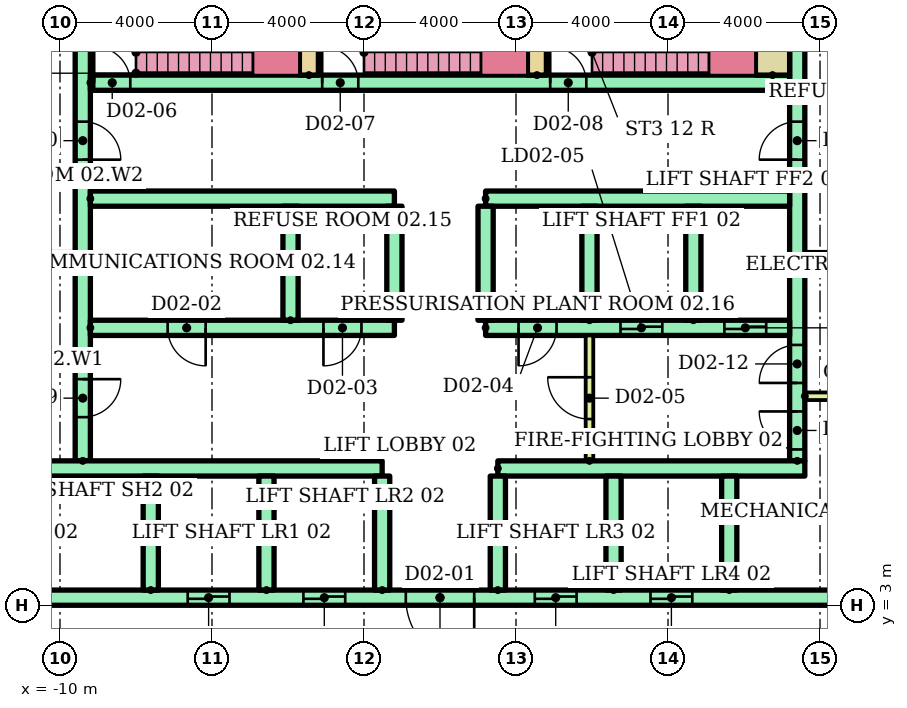
"""IFC4 building model, lengths in metres.
Left out: names, types, materials, properties, quantities, classifications, styles, units other than length and angle.
Written with IfcOpenShell. Run it as: python <this file> out.ifc"""

import sys

from ifc_helpers import new_model, si_unit, direction, frame, frame_2d, origin, place, context, subcontext, project, spatial, rectangle, extrude, element, fill, save


model = new_model("IFC4")
c1 = context("Model", 3, precision=1e-05, world=origin(), true_north=direction((0.0, 1.0)))
c2 = subcontext(c1, "Body", "Model", "MODEL_VIEW")
j1 = project(units=[si_unit("LENGTHUNIT", "METRE"), si_unit("PLANEANGLEUNIT", "RADIAN")], contexts=[c1])
p1 = place(None, origin())
s1 = spatial("IfcSite", under=j1, at=p1, CompositionType="ELEMENT")
p2 = place(p1, origin())
s2 = spatial("IfcBuilding", under=s1, at=p2, CompositionType="ELEMENT")
p3 = place(p2, frame((0.0, 0.0, 10.0)))
s3 = spatial("IfcBuildingStorey", under=s2, at=p3, CompositionType="ELEMENT", Elevation=10.0)
p4 = place(p3, frame((-9.4, 6.8, 0.0), z_axis=(0.0, 0.0, 1.0), x_axis=(0.0, 1.0, 0.0)))
e1 = element("IfcWall", 1, at=p4, inside=s3, PredefinedType="SHEAR", context=c2, shape_type="SweptSolid", body=[
    extrude(rectangle(XDim=12.7, YDim=0.4, at=frame_2d((6.35, 0.0))), origin(), (0.0, 0.0, 1.0), 3.7),
])
p5 = place(p4, frame((1.15, 0.0, 0.0)))
e2 = element("IfcOpeningElement", 2, at=p5, cuts=e1, PredefinedType="OPENING", context=c2, shape_type="SweptSolid", body=[
    extrude(rectangle(XDim=1.0, YDim=2.1, at=frame_2d((0.5, 1.05))), frame((0.0, 0.21, 0.0), z_axis=(0.0, -1.0, 0.0), x_axis=(1.0, 0.0, 0.0)), (0.0, 0.0, 1.0), 0.42),
])
p6 = place(p4, frame((7.925, 0.0, 0.0)))
e3 = element("IfcOpeningElement", 3, at=p6, cuts=e1, PredefinedType="OPENING", context=c2, shape_type="SweptSolid", body=[
    extrude(rectangle(XDim=1.0, YDim=2.1, at=frame_2d((0.5, 1.05))), frame((0.0, 0.21, 0.0), z_axis=(0.0, -1.0, 0.0), x_axis=(1.0, 0.0, 0.0)), (0.0, 0.0, 1.0), 0.42),
])
p7 = place(p3, frame((9.4, 6.8, 0.0), z_axis=(0.0, 0.0, 1.0), x_axis=(0.0, 1.0, 0.0)))
e4 = element("IfcWall", 4, at=p7, inside=s3, PredefinedType="SHEAR", context=c2, shape_type="SweptSolid", body=[
    extrude(rectangle(XDim=12.7, YDim=0.4, at=frame_2d((6.35, 0.0))), origin(), (0.0, 0.0, 1.0), 3.7),
])
p8 = place(p7, frame((0.3, 0.0, 0.0)))
e5 = element("IfcOpeningElement", 5, at=p8, cuts=e4, PredefinedType="OPENING", context=c2, shape_type="SweptSolid", body=[
    extrude(rectangle(XDim=1.0, YDim=2.1, at=frame_2d((0.5, 1.05))), frame((0.0, 0.21, 0.0), z_axis=(0.0, -1.0, 0.0), x_axis=(1.0, 0.0, 0.0)), (0.0, 0.0, 1.0), 0.42),
])
p9 = place(p7, frame((2.05, 0.0, 0.0)))
e6 = element("IfcOpeningElement", 6, at=p9, cuts=e4, PredefinedType="OPENING", context=c2, shape_type="SweptSolid", body=[
    extrude(rectangle(XDim=1.0, YDim=2.1, at=frame_2d((0.5, 1.05))), frame((0.0, 0.21, 0.0), z_axis=(0.0, -1.0, 0.0), x_axis=(1.0, 0.0, 0.0)), (0.0, 0.0, 1.0), 0.42),
])
p10 = place(p7, frame((7.925, 0.0, 0.0)))
e7 = element("IfcOpeningElement", 7, at=p10, cuts=e4, PredefinedType="OPENING", context=c2, shape_type="SweptSolid", body=[
    extrude(rectangle(XDim=1.0, YDim=2.1, at=frame_2d((0.5, 1.05))), frame((0.0, 0.21, 0.0), z_axis=(0.0, -1.0, 0.0), x_axis=(1.0, 0.0, 0.0)), (0.0, 0.0, 1.0), 0.42),
])
p11 = place(p3, frame((-13.5, 3.2, 0.0)))
e8 = element("IfcWall", 8, at=p11, inside=s3, PredefinedType="SHEAR", context=c2, shape_type="SweptSolid", body=[
    extrude(rectangle(XDim=27.0, YDim=0.4, at=frame_2d((13.5, 0.0))), origin(), (0.0, 0.0, 1.0), 3.7),
])
p12 = place(p11, frame((6.861, 0.0, 0.0)))
e9 = element("IfcOpeningElement", 9, at=p12, cuts=e8, PredefinedType="OPENING", context=c2, shape_type="SweptSolid", body=[
    extrude(rectangle(XDim=1.1, YDim=2.1, at=frame_2d((0.55, 1.05))), frame((0.0, 0.21, 0.0), z_axis=(0.0, -1.0, 0.0), x_axis=(1.0, 0.0, 0.0)), (0.0, 0.0, 1.0), 0.42),
])
p13 = place(p11, frame((9.906, 0.0, 0.0)))
e10 = element("IfcOpeningElement", 10, at=p13, cuts=e8, PredefinedType="OPENING", context=c2, shape_type="SweptSolid", body=[
    extrude(rectangle(XDim=1.1, YDim=2.1, at=frame_2d((0.55, 1.05))), frame((0.0, 0.21, 0.0), z_axis=(0.0, -1.0, 0.0), x_axis=(1.0, 0.0, 0.0)), (0.0, 0.0, 1.0), 0.42),
])
p14 = place(p11, frame((15.994, 0.0, 0.0)))
e11 = element("IfcOpeningElement", 11, at=p14, cuts=e8, PredefinedType="OPENING", context=c2, shape_type="SweptSolid", body=[
    extrude(rectangle(XDim=1.1, YDim=2.1, at=frame_2d((0.55, 1.05))), frame((0.0, 0.21, 0.0), z_axis=(0.0, -1.0, 0.0), x_axis=(1.0, 0.0, 0.0)), (0.0, 0.0, 1.0), 0.42),
])
p15 = place(p11, frame((19.039, 0.0, 0.0)))
e12 = element("IfcOpeningElement", 12, at=p15, cuts=e8, PredefinedType="OPENING", context=c2, shape_type="SweptSolid", body=[
    extrude(rectangle(XDim=1.1, YDim=2.1, at=frame_2d((0.55, 1.05))), frame((0.0, 0.21, 0.0), z_axis=(0.0, -1.0, 0.0), x_axis=(1.0, 0.0, 0.0)), (0.0, 0.0, 1.0), 0.42),
])
p16 = place(p11, frame((12.6, 0.0, 0.0)))
e13 = element("IfcOpeningElement", 13, at=p16, cuts=e8, PredefinedType="OPENING", context=c2, shape_type="SweptSolid", body=[
    extrude(rectangle(XDim=1.8, YDim=2.1, at=frame_2d((0.9, 1.05))), frame((0.0, 0.21, 0.0), z_axis=(0.0, -1.0, 0.0), x_axis=(1.0, 0.0, 0.0)), (0.0, 0.0, 1.0), 0.42),
])
p17 = place(p3, frame((-13.5, 6.6, 0.0)))
e14 = element("IfcWall", 14, at=p17, inside=s3, PredefinedType="SHEAR", context=c2, shape_type="SweptSolid", body=[
    extrude(rectangle(XDim=11.978, YDim=0.4, at=frame_2d((5.989, 0.0))), origin(), (0.0, 0.0, 1.0), 3.7),
])
p18 = place(p3, frame((1.522, 6.6, 0.0)))
e15 = element("IfcWall", 15, at=p18, inside=s3, PredefinedType="SHEAR", context=c2, shape_type="SweptSolid", body=[
    extrude(rectangle(XDim=8.078, YDim=0.4, at=frame_2d((4.039, 0.0))), origin(), (0.0, 0.0, 1.0), 3.7),
])
for number, where, z_axis, x_axis in (
    (16, (-7.611, 3.4, 0.0), (0.0, 0.0, 1.0), (0.0, 1.0, 0.0)),
    (17, (-4.567, 3.4, 0.0), (0.0, 0.0, 1.0), (0.0, 1.0, 0.0)),
    (18, (-1.522, 3.4, 0.0), (0.0, 0.0, 1.0), (0.0, 1.0, 0.0)),
    (19, (1.522, 3.4, 0.0), (0.0, 0.0, 1.0), (0.0, 1.0, 0.0)),
    (20, (4.567, 3.4, 0.0), (0.0, 0.0, 1.0), (0.0, 1.0, 0.0)),
    (21, (7.611, 3.4, 0.0), (0.0, 0.0, 1.0), (0.0, 1.0, 0.0)),
):
    element("IfcWall", number, at=place(p3, frame(where, z_axis=z_axis, x_axis=x_axis)), inside=s3, PredefinedType="SHEAR", context=c2, shape_type="SweptSolid", body=[
        extrude(rectangle(XDim=3.0, YDim=0.4, at=frame_2d((1.5, 0.0))), origin(), (0.0, 0.0, 1.0), 3.7),
    ])
p19 = place(p3, frame((-9.2, 10.3, 0.0)))
e22 = element("IfcWall", 22, at=p19, inside=s3, PredefinedType="SHEAR", context=c2, shape_type="SweptSolid", body=[
    extrude(rectangle(XDim=8.0, YDim=0.4, at=frame_2d((4.0, 0.0))), origin(), (0.0, 0.0, 1.0), 3.7),
])
p20 = place(p19, frame((2.033, 0.0, 0.0)))
e23 = element("IfcOpeningElement", 23, at=p20, cuts=e22, PredefinedType="OPENING", context=c2, shape_type="SweptSolid", body=[
    extrude(rectangle(XDim=1.0, YDim=2.1, at=frame_2d((0.5, 1.05))), frame((0.0, 0.21, 0.0), z_axis=(0.0, -1.0, 0.0), x_axis=(1.0, 0.0, 0.0)), (0.0, 0.0, 1.0), 0.42),
])
p21 = place(p19, frame((6.133, 0.0, 0.0)))
e24 = element("IfcOpeningElement", 24, at=p21, cuts=e22, PredefinedType="OPENING", context=c2, shape_type="SweptSolid", body=[
    extrude(rectangle(XDim=1.0, YDim=2.1, at=frame_2d((0.5, 1.05))), frame((0.0, 0.21, 0.0), z_axis=(0.0, -1.0, 0.0), x_axis=(1.0, 0.0, 0.0)), (0.0, 0.0, 1.0), 0.42),
])
p22 = place(p3, frame((-9.2, 13.7, 0.0)))
e25 = element("IfcWall", 25, at=p22, inside=s3, PredefinedType="SHEAR", context=c2, shape_type="SweptSolid", body=[
    extrude(rectangle(XDim=8.0, YDim=0.4, at=frame_2d((4.0, 0.0))), origin(), (0.0, 0.0, 1.0), 3.7),
])
p23 = place(p3, frame((1.2, 10.3, 0.0)))
e26 = element("IfcWall", 26, at=p23, inside=s3, PredefinedType="SHEAR", context=c2, shape_type="SweptSolid", body=[
    extrude(rectangle(XDim=8.0, YDim=0.4, at=frame_2d((4.0, 0.0))), origin(), (0.0, 0.0, 1.0), 3.7),
])
p24 = place(p23, frame((3.55, 0.0, 0.0)))
e27 = element("IfcOpeningElement", 27, at=p24, cuts=e26, PredefinedType="OPENING", context=c2, shape_type="SweptSolid", body=[
    extrude(rectangle(XDim=1.1, YDim=2.1, at=frame_2d((0.55, 1.05))), frame((0.0, 0.21, 0.0), z_axis=(0.0, -1.0, 0.0), x_axis=(1.0, 0.0, 0.0)), (0.0, 0.0, 1.0), 0.42),
])
p25 = place(p23, frame((6.283, 0.0, 0.0)))
e28 = element("IfcOpeningElement", 28, at=p25, cuts=e26, PredefinedType="OPENING", context=c2, shape_type="SweptSolid", body=[
    extrude(rectangle(XDim=1.1, YDim=2.1, at=frame_2d((0.55, 1.05))), frame((0.0, 0.21, 0.0), z_axis=(0.0, -1.0, 0.0), x_axis=(1.0, 0.0, 0.0)), (0.0, 0.0, 1.0), 0.42),
])
p26 = place(p23, frame((0.867, 0.0, 0.0)))
e29 = element("IfcOpeningElement", 29, at=p26, cuts=e26, PredefinedType="OPENING", context=c2, shape_type="SweptSolid", body=[
    extrude(rectangle(XDim=1.0, YDim=2.1, at=frame_2d((0.5, 1.05))), frame((0.0, 0.21, 0.0), z_axis=(0.0, -1.0, 0.0), x_axis=(1.0, 0.0, 0.0)), (0.0, 0.0, 1.0), 0.42),
])
p27 = place(p3, frame((1.2, 13.7, 0.0)))
e30 = element("IfcWall", 30, at=p27, inside=s3, PredefinedType="SHEAR", context=c2, shape_type="SweptSolid", body=[
    extrude(rectangle(XDim=8.0, YDim=0.4, at=frame_2d((4.0, 0.0))), origin(), (0.0, 0.0, 1.0), 3.7),
])
for number, where, z_axis, x_axis in (
    (31, (-3.933, 10.5, 0.0), (0.0, 0.0, 1.0), (0.0, 1.0, 0.0)),
    (32, (-1.2, 10.5, 0.0), (0.0, 0.0, 1.0), (0.0, 1.0, 0.0)),
    (33, (1.2, 10.5, 0.0), (0.0, 0.0, 1.0), (0.0, 1.0, 0.0)),
    (34, (3.933, 10.5, 0.0), (0.0, 0.0, 1.0), (0.0, 1.0, 0.0)),
    (35, (6.667, 10.5, 0.0), (0.0, 0.0, 1.0), (0.0, 1.0, 0.0)),
):
    element("IfcWall", number, at=place(p3, frame(where, z_axis=z_axis, x_axis=x_axis)), inside=s3, PredefinedType="SHEAR", context=c2, shape_type="SweptSolid", body=[
        extrude(rectangle(XDim=3.0, YDim=0.4, at=frame_2d((1.5, 0.0))), origin(), (0.0, 0.0, 1.0), 3.7),
    ])
p28 = place(p3, frame((3.933, 6.8, 0.0), z_axis=(0.0, 0.0, 1.0), x_axis=(0.0, 1.0, 0.0)))
e36 = element("IfcWall", 36, at=p28, inside=s3, PredefinedType="PARTITIONING", context=c2, shape_type="SweptSolid", body=[
    extrude(rectangle(XDim=3.3, YDim=0.2, at=frame_2d((1.65, 0.0))), origin(), (0.0, 0.0, 1.0), 3.7),
])
p29 = place(p28, frame((1.1, 0.0, 0.0)))
e37 = element("IfcOpeningElement", 37, at=p29, cuts=e36, PredefinedType="OPENING", context=c2, shape_type="SweptSolid", body=[
    extrude(rectangle(XDim=1.1, YDim=2.1, at=frame_2d((0.55, 1.05))), frame((0.0, 0.11, 0.0), z_axis=(0.0, -1.0, 0.0), x_axis=(1.0, 0.0, 0.0)), (0.0, 0.0, 1.0), 0.22),
])
p30 = place(p3, frame((-9.2, 16.75, 0.0)))
e38 = element("IfcWall", 38, at=p30, inside=s3, PredefinedType="SHEAR", context=c2, shape_type="SweptSolid", body=[
    extrude(rectangle(XDim=18.4, YDim=0.4, at=frame_2d((9.2, 0.0))), origin(), (0.0, 0.0, 1.0), 3.7),
])
p31 = place(p30, frame((0.1, 0.0, 0.0)))
e39 = element("IfcOpeningElement", 39, at=p31, cuts=e38, PredefinedType="OPENING", context=c2, shape_type="SweptSolid", body=[
    extrude(rectangle(XDim=0.95, YDim=2.1, at=frame_2d((0.475, 1.05))), frame((0.0, 0.21, 0.0), z_axis=(0.0, -1.0, 0.0), x_axis=(1.0, 0.0, 0.0)), (0.0, 0.0, 1.0), 0.42),
])
p32 = place(p30, frame((6.1, 0.0, 0.0)))
e40 = element("IfcOpeningElement", 40, at=p32, cuts=e38, PredefinedType="OPENING", context=c2, shape_type="SweptSolid", body=[
    extrude(rectangle(XDim=0.95, YDim=2.1, at=frame_2d((0.475, 1.05))), frame((0.0, 0.21, 0.0), z_axis=(0.0, -1.0, 0.0), x_axis=(1.0, 0.0, 0.0)), (0.0, 0.0, 1.0), 0.42),
])
p33 = place(p30, frame((12.1, 0.0, 0.0)))
e41 = element("IfcOpeningElement", 41, at=p33, cuts=e38, PredefinedType="OPENING", context=c2, shape_type="SweptSolid", body=[
    extrude(rectangle(XDim=0.95, YDim=2.1, at=frame_2d((0.475, 1.05))), frame((0.0, 0.21, 0.0), z_axis=(0.0, -1.0, 0.0), x_axis=(1.0, 0.0, 0.0)), (0.0, 0.0, 1.0), 0.42),
])
for number, where, z_axis, x_axis in (
    (42, (-3.45, 16.95, 0.0), (0.0, 0.0, 1.0), (0.0, 1.0, 0.0)),
    (43, (2.55, 16.95, 0.0), (0.0, 0.0, 1.0), (0.0, 1.0, 0.0)),
):
    element("IfcWall", number, at=place(p3, frame(where, z_axis=z_axis, x_axis=x_axis)), inside=s3, PredefinedType="SHEAR", context=c2, shape_type="SweptSolid", body=[
        extrude(rectangle(XDim=2.55, YDim=0.5, at=frame_2d((1.275, 0.0))), origin(), (0.0, 0.0, 1.0), 3.7),
    ])
p34 = place(p3, frame((8.75, 16.95, 0.0), z_axis=(0.0, 0.0, 1.0), x_axis=(0.0, 1.0, 0.0)))
e44 = element("IfcWall", 44, at=p34, inside=s3, PredefinedType="SHEAR", context=c2, shape_type="SweptSolid", body=[
    extrude(rectangle(XDim=2.55, YDim=0.9, at=frame_2d((1.275, 0.0))), origin(), (0.0, 0.0, 1.0), 3.7),
])
for number, where in (
    (45, (-13.5, 12.2, 0.0)),
    (46, (9.6, 8.5, 0.0)),
    (47, (9.6, 12.2, 0.0)),
):
    element("IfcWall", number, at=place(p3, frame(where)), inside=s3, PredefinedType="PARTITIONING", context=c2, shape_type="SweptSolid", body=[
        extrude(rectangle(XDim=3.9, YDim=0.2, at=frame_2d((1.95, 0.0))), origin(), (0.0, 0.0, 1.0), 3.7),
    ])
p35 = place(p12, origin())
e48 = element("IfcDoor", 48, at=p35, inside=s3, OperationType="SLIDING_TO_LEFT", PredefinedType="DOOR", context=c2, shape_type="SweptSolid", body=[
    extrude(rectangle(XDim=1.1, YDim=2.1, at=frame_2d((0.55, 1.05))), frame((0.0, 0.025, 0.0), z_axis=(0.0, -1.0, 0.0), x_axis=(1.0, 0.0, 0.0)), (0.0, 0.0, 1.0), 0.05),
])
fill(e9, e48)
p36 = place(p13, origin())
e49 = element("IfcDoor", 49, at=p36, inside=s3, OperationType="SLIDING_TO_LEFT", PredefinedType="DOOR", context=c2, shape_type="SweptSolid", body=[
    extrude(rectangle(XDim=1.1, YDim=2.1, at=frame_2d((0.55, 1.05))), frame((0.0, 0.025, 0.0), z_axis=(0.0, -1.0, 0.0), x_axis=(1.0, 0.0, 0.0)), (0.0, 0.0, 1.0), 0.05),
])
fill(e10, e49)
p37 = place(p14, origin())
e50 = element("IfcDoor", 50, at=p37, inside=s3, OperationType="SLIDING_TO_LEFT", PredefinedType="DOOR", context=c2, shape_type="SweptSolid", body=[
    extrude(rectangle(XDim=1.1, YDim=2.1, at=frame_2d((0.55, 1.05))), frame((0.0, 0.025, 0.0), z_axis=(0.0, -1.0, 0.0), x_axis=(1.0, 0.0, 0.0)), (0.0, 0.0, 1.0), 0.05),
])
fill(e11, e50)
p38 = place(p15, origin())
e51 = element("IfcDoor", 51, at=p38, inside=s3, OperationType="SLIDING_TO_LEFT", PredefinedType="DOOR", context=c2, shape_type="SweptSolid", body=[
    extrude(rectangle(XDim=1.1, YDim=2.1, at=frame_2d((0.55, 1.05))), frame((0.0, 0.025, 0.0), z_axis=(0.0, -1.0, 0.0), x_axis=(1.0, 0.0, 0.0)), (0.0, 0.0, 1.0), 0.05),
])
fill(e12, e51)
p39 = place(p16, frame((1.8, 0.0, 0.0), z_axis=(0.0, 0.0, 1.0), x_axis=(-1.0, 0.0, 0.0)))
e52 = element("IfcDoor", 52, at=p39, inside=s3, OperationType="DOUBLE_DOOR_SINGLE_SWING", PredefinedType="DOOR", context=c2, shape_type="SweptSolid", body=[
    extrude(rectangle(XDim=1.8, YDim=2.1, at=frame_2d((0.9, 1.05))), frame((0.0, 0.025, 0.0), z_axis=(0.0, -1.0, 0.0), x_axis=(1.0, 0.0, 0.0)), (0.0, 0.0, 1.0), 0.05),
])
fill(e13, e52)
p40 = place(p24, origin())
e53 = element("IfcDoor", 53, at=p40, inside=s3, OperationType="SLIDING_TO_LEFT", PredefinedType="DOOR", context=c2, shape_type="SweptSolid", body=[
    extrude(rectangle(XDim=1.1, YDim=2.1, at=frame_2d((0.55, 1.05))), frame((0.0, 0.025, 0.0), z_axis=(0.0, -1.0, 0.0), x_axis=(1.0, 0.0, 0.0)), (0.0, 0.0, 1.0), 0.05),
])
fill(e27, e53)
p41 = place(p25, origin())
e54 = element("IfcDoor", 54, at=p41, inside=s3, OperationType="SLIDING_TO_LEFT", PredefinedType="DOOR", context=c2, shape_type="SweptSolid", body=[
    extrude(rectangle(XDim=1.1, YDim=2.1, at=frame_2d((0.55, 1.05))), frame((0.0, 0.025, 0.0), z_axis=(0.0, -1.0, 0.0), x_axis=(1.0, 0.0, 0.0)), (0.0, 0.0, 1.0), 0.05),
])
fill(e28, e54)
p42 = place(p20, frame((1.0, 0.0, 0.0), z_axis=(0.0, 0.0, 1.0), x_axis=(-1.0, 0.0, 0.0)))
e55 = element("IfcDoor", 55, at=p42, inside=s3, OperationType="SINGLE_SWING_RIGHT", PredefinedType="DOOR", context=c2, shape_type="SweptSolid", body=[
    extrude(rectangle(XDim=1.0, YDim=2.1, at=frame_2d((0.5, 1.05))), frame((0.0, 0.025, 0.0), z_axis=(0.0, -1.0, 0.0), x_axis=(1.0, 0.0, 0.0)), (0.0, 0.0, 1.0), 0.05),
])
fill(e23, e55)
p43 = place(p21, frame((1.0, 0.0, 0.0), z_axis=(0.0, 0.0, 1.0), x_axis=(-1.0, 0.0, 0.0)))
e56 = element("IfcDoor", 56, at=p43, inside=s3, OperationType="SINGLE_SWING_LEFT", PredefinedType="DOOR", context=c2, shape_type="SweptSolid", body=[
    extrude(rectangle(XDim=1.0, YDim=2.1, at=frame_2d((0.5, 1.05))), frame((0.0, 0.025, 0.0), z_axis=(0.0, -1.0, 0.0), x_axis=(1.0, 0.0, 0.0)), (0.0, 0.0, 1.0), 0.05),
])
fill(e24, e56)
p44 = place(p26, frame((1.0, 0.0, 0.0), z_axis=(0.0, 0.0, 1.0), x_axis=(-1.0, 0.0, 0.0)))
e57 = element("IfcDoor", 57, at=p44, inside=s3, OperationType="SINGLE_SWING_LEFT", PredefinedType="DOOR", context=c2, shape_type="SweptSolid", body=[
    extrude(rectangle(XDim=1.0, YDim=2.1, at=frame_2d((0.5, 1.05))), frame((0.0, 0.025, 0.0), z_axis=(0.0, -1.0, 0.0), x_axis=(1.0, 0.0, 0.0)), (0.0, 0.0, 1.0), 0.05),
])
fill(e29, e57)
p45 = place(p29, origin())
e58 = element("IfcDoor", 58, at=p45, inside=s3, OperationType="SINGLE_SWING_RIGHT", PredefinedType="DOOR", context=c2, shape_type="SweptSolid", body=[
    extrude(rectangle(XDim=1.1, YDim=2.1, at=frame_2d((0.55, 1.05))), frame((0.0, 0.025, 0.0), z_axis=(0.0, -1.0, 0.0), x_axis=(1.0, 0.0, 0.0)), (0.0, 0.0, 1.0), 0.05),
])
fill(e37, e58)
p46 = place(p31, origin())
e59 = element("IfcDoor", 59, at=p46, inside=s3, OperationType="SINGLE_SWING_LEFT", PredefinedType="DOOR", context=c2, shape_type="SweptSolid", body=[
    extrude(rectangle(XDim=0.95, YDim=2.1, at=frame_2d((0.475, 1.05))), frame((0.0, 0.025, 0.0), z_axis=(0.0, -1.0, 0.0), x_axis=(1.0, 0.0, 0.0)), (0.0, 0.0, 1.0), 0.05),
])
fill(e39, e59)
p47 = place(p32, origin())
e60 = element("IfcDoor", 60, at=p47, inside=s3, OperationType="SINGLE_SWING_LEFT", PredefinedType="DOOR", context=c2, shape_type="SweptSolid", body=[
    extrude(rectangle(XDim=0.95, YDim=2.1, at=frame_2d((0.475, 1.05))), frame((0.0, 0.025, 0.0), z_axis=(0.0, -1.0, 0.0), x_axis=(1.0, 0.0, 0.0)), (0.0, 0.0, 1.0), 0.05),
])
fill(e40, e60)
p48 = place(p33, origin())
e61 = element("IfcDoor", 61, at=p48, inside=s3, OperationType="SINGLE_SWING_LEFT", PredefinedType="DOOR", context=c2, shape_type="SweptSolid", body=[
    extrude(rectangle(XDim=0.95, YDim=2.1, at=frame_2d((0.475, 1.05))), frame((0.0, 0.025, 0.0), z_axis=(0.0, -1.0, 0.0), x_axis=(1.0, 0.0, 0.0)), (0.0, 0.0, 1.0), 0.05),
])
fill(e41, e61)
p49 = place(p5, frame((1.0, 0.0, 0.0), z_axis=(0.0, 0.0, 1.0), x_axis=(-1.0, 0.0, 0.0)))
e62 = element("IfcDoor", 62, at=p49, inside=s3, OperationType="SINGLE_SWING_RIGHT", PredefinedType="DOOR", context=c2, shape_type="SweptSolid", body=[
    extrude(rectangle(XDim=1.0, YDim=2.1, at=frame_2d((0.5, 1.05))), frame((0.0, 0.025, 0.0), z_axis=(0.0, -1.0, 0.0), x_axis=(1.0, 0.0, 0.0)), (0.0, 0.0, 1.0), 0.05),
])
fill(e2, e62)
p50 = place(p6, frame((1.0, 0.0, 0.0), z_axis=(0.0, 0.0, 1.0), x_axis=(-1.0, 0.0, 0.0)))
e63 = element("IfcDoor", 63, at=p50, inside=s3, OperationType="SINGLE_SWING_LEFT", PredefinedType="DOOR", context=c2, shape_type="SweptSolid", body=[
    extrude(rectangle(XDim=1.0, YDim=2.1, at=frame_2d((0.5, 1.05))), frame((0.0, 0.025, 0.0), z_axis=(0.0, -1.0, 0.0), x_axis=(1.0, 0.0, 0.0)), (0.0, 0.0, 1.0), 0.05),
])
fill(e3, e63)
p51 = place(p8, origin())
e64 = element("IfcDoor", 64, at=p51, inside=s3, OperationType="SINGLE_SWING_RIGHT", PredefinedType="DOOR", context=c2, shape_type="SweptSolid", body=[
    extrude(rectangle(XDim=1.0, YDim=2.1, at=frame_2d((0.5, 1.05))), frame((0.0, 0.025, 0.0), z_axis=(0.0, -1.0, 0.0), x_axis=(1.0, 0.0, 0.0)), (0.0, 0.0, 1.0), 0.05),
])
fill(e5, e64)
p52 = place(p9, origin())
e65 = element("IfcDoor", 65, at=p52, inside=s3, OperationType="SINGLE_SWING_LEFT", PredefinedType="DOOR", context=c2, shape_type="SweptSolid", body=[
    extrude(rectangle(XDim=1.0, YDim=2.1, at=frame_2d((0.5, 1.05))), frame((0.0, 0.025, 0.0), z_axis=(0.0, -1.0, 0.0), x_axis=(1.0, 0.0, 0.0)), (0.0, 0.0, 1.0), 0.05),
])
fill(e6, e65)
p53 = place(p10, origin())
e66 = element("IfcDoor", 66, at=p53, inside=s3, OperationType="SINGLE_SWING_LEFT", PredefinedType="DOOR", context=c2, shape_type="SweptSolid", body=[
    extrude(rectangle(XDim=1.0, YDim=2.1, at=frame_2d((0.5, 1.05))), frame((0.0, 0.025, 0.0), z_axis=(0.0, -1.0, 0.0), x_axis=(1.0, 0.0, 0.0)), (0.0, 0.0, 1.0), 0.05),
])
fill(e7, e66)
save(model, sys.argv[1])
